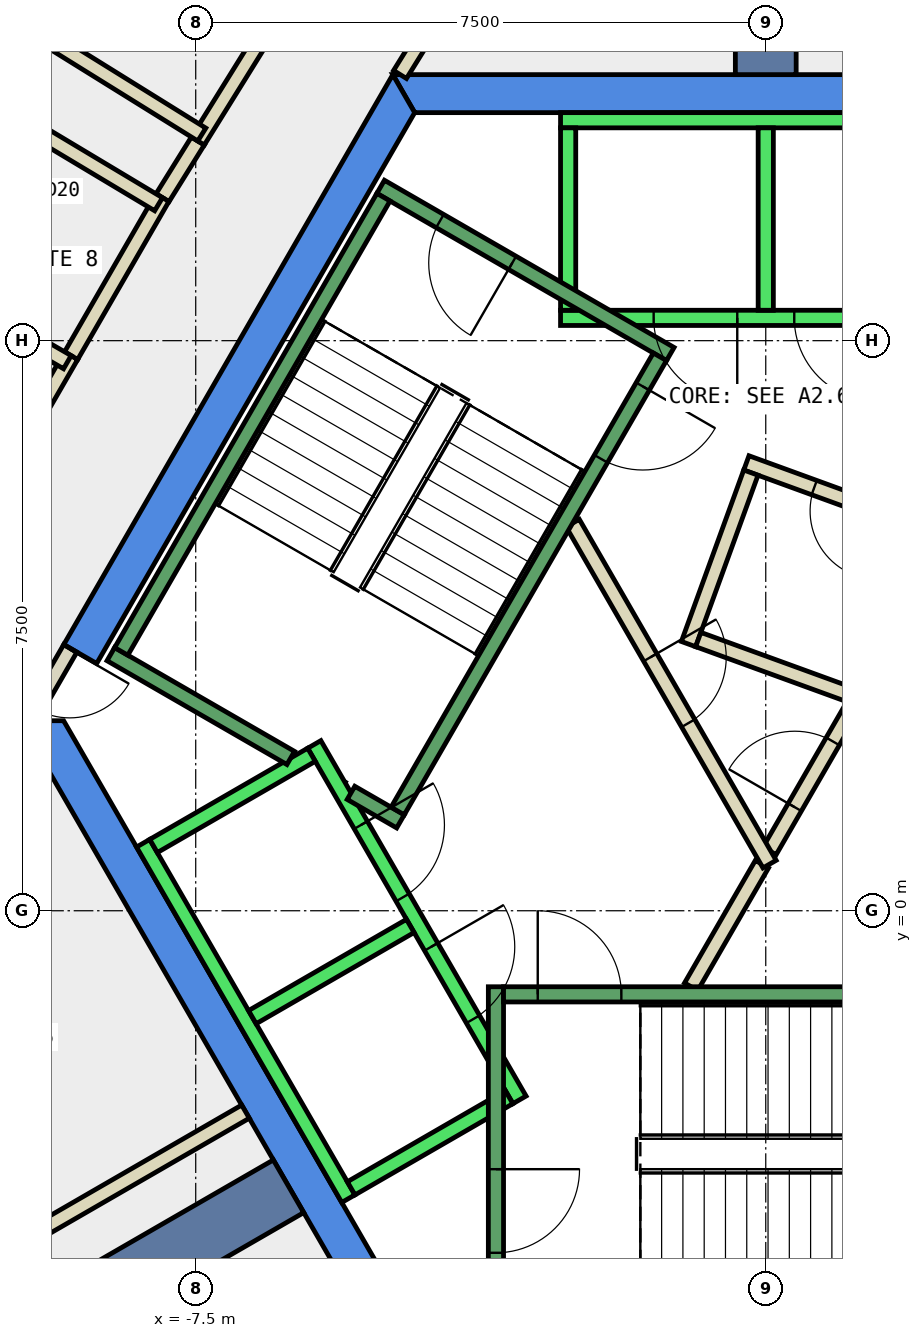
"""IFC4 building model, lengths in metres.
Left out: names, types, materials, properties, quantities, classifications, styles, units other than length and angle.
Written with IfcOpenShell. Run it as: python <this file> out.ifc"""

import sys

from ifc_helpers import new_model, si_unit, direction, frame, frame_2d, origin, place, context, subcontext, project, spatial, polyline, rectangle, outline, extrude, element, fill, save


model = new_model("IFC4")
c1 = context("Model", 3, precision=1e-05, world=origin(), true_north=direction((0.0, 1.0)))
c2 = subcontext(c1, "Body", "Model", "MODEL_VIEW")
j1 = project(units=[si_unit("LENGTHUNIT", "METRE"), si_unit("PLANEANGLEUNIT", "RADIAN")], contexts=[c1])
p1 = place(None, origin())
s1 = spatial("IfcSite", under=j1, at=p1, CompositionType="ELEMENT")
p2 = place(p1, origin())
s2 = spatial("IfcBuilding", under=s1, at=p2, CompositionType="ELEMENT")
p3 = place(p2, frame((0.0, 0.0, 293.6)))
s3 = spatial("IfcBuildingStorey", under=s2, at=p3, CompositionType="ELEMENT", Elevation=293.6)
p4 = place(p3, frame((0.0, 0.0, -0.34)))
e1 = element("IfcWall", 1, at=p4, inside=s3, PredefinedType="SHEAR", context=c2, shape_type="SweptSolid", body=[
    extrude(outline(polyline([(4.907, 11.0), (-4.907, 11.0), (-4.619, 10.5), (4.619, 10.5), (4.907, 11.0)])), origin(), (0.0, 0.0, 1.0), 3.6),
])
p5 = place(p3, frame((0.0, 0.0, -0.34)))
e2 = element("IfcWall", 2, at=p5, inside=s3, PredefinedType="SHEAR", context=c2, shape_type="SweptSolid", body=[
    extrude(outline(polyline([(-9.236, 3.502), (-8.803, 3.253), (-4.619, 10.5), (-4.907, 11.0), (-9.236, 3.502)])), origin(), (0.0, 0.0, 1.0), 3.6),
])
p6 = place(p3, frame((0.0, 0.0, -0.34)))
e3 = element("IfcWall", 3, at=p6, inside=s3, PredefinedType="SHEAR", context=c2, shape_type="SweptSolid", body=[
    extrude(outline(polyline([(-9.815, 2.5), (-4.907, -6.0), (-4.619, -5.5), (-9.238, 2.5), (-9.815, 2.5)])), origin(), (0.0, 0.0, 1.0), 3.6),
])
p7 = place(p3, frame((0.0, 11.0, -0.34), z_axis=(0.0, 0.0, 1.0), x_axis=(0.0, 1.0, 0.0)))
e4 = element("IfcWall", 4, at=p7, inside=s3, PredefinedType="SHEAR", context=c2, shape_type="SweptSolid", body=[
    extrude(rectangle(XDim=9.0, YDim=0.8, at=frame_2d((4.5, 0.0))), origin(), (0.0, 0.0, 1.0), 3.6),
])
p8 = place(p3, frame((-6.279, -3.625, -0.34), z_axis=(0.0, 0.0, 1.0), x_axis=(-0.866017533419, -0.500013631625, 0.0)))
e5 = element("IfcWall", 5, at=p8, inside=s3, PredefinedType="SHEAR", context=c2, shape_type="SweptSolid", body=[
    extrude(rectangle(XDim=9.0, YDim=0.8, at=frame_2d((4.5, 0.0))), origin(), (0.0, 0.0, 1.0), 3.6),
])
p9 = place(p3, frame((2.376, 4.934, 0.0), z_axis=(0.0, 0.0, 1.0), x_axis=(-0.939640574808, 0.342163104635, 0.0)))
e6 = element("IfcWall", 6, at=p9, inside=s3, PredefinedType="PARTITIONING", context=c2, shape_type="SweptSolid", body=[
    extrude(rectangle(XDim=2.8, YDim=0.2, at=frame_2d((1.4, 0.0))), origin(), (0.0, 0.0, 1.0), 3.26),
])
p10 = place(p9, frame((0.95, 0.0, 0.0)))
e7 = element("IfcOpeningElement", 7, at=p10, cuts=e6, PredefinedType="OPENING", context=c2, shape_type="SweptSolid", body=[
    extrude(rectangle(XDim=0.9, YDim=2.1, at=frame_2d((0.45, 1.05))), frame((0.0, 0.11, 0.0), z_axis=(0.0, -1.0, 0.0), x_axis=(1.0, 0.0, 0.0)), (0.0, 0.0, 1.0), 0.22),
])
p11 = place(p3, frame((-0.196, 5.764, 0.0), z_axis=(0.0, 0.0, 1.0), x_axis=(-0.34165322761, -0.939826086073, 0.0)))
e8 = element("IfcWall", 8, at=p11, inside=s3, PredefinedType="PARTITIONING", context=c2, shape_type="SweptSolid", body=[
    extrude(rectangle(XDim=2.4, YDim=0.2, at=frame_2d((1.2, 0.0))), origin(), (0.0, 0.0, 1.0), 3.26),
])
p12 = place(p3, frame((-0.888, 3.568, 0.0), z_axis=(0.0, 0.0, 1.0), x_axis=(0.939685034098, -0.34204098686, 0.0)))
e9 = element("IfcWall", 9, at=p12, inside=s3, PredefinedType="PARTITIONING", context=c2, shape_type="SweptSolid", body=[
    extrude(rectangle(XDim=2.237, YDim=0.2, at=frame_2d((1.119, 0.0))), origin(), (0.0, 0.0, 1.0), 3.26),
])
p13 = place(p3, frame((-4.478, 11.54, 0.0), z_axis=(0.0, 0.0, 1.0), x_axis=(-0.527362861778, -0.849640166198, 0.0)))
e10 = element("IfcWall", 10, at=p13, inside=s3, PredefinedType="PARTITIONING", context=c2, shape_type="SweptSolid", body=[
    extrude(rectangle(XDim=0.633, YDim=0.2, at=frame_2d((0.317, 0.0))), origin(), (0.0, 0.0, 1.0), 3.26),
])
p14 = place(p3, frame((-7.937, 9.38, 0.0), z_axis=(0.0, 0.0, 1.0), x_axis=(0.52850186976, 0.848932137252, 0.0)))
e11 = element("IfcWall", 11, at=p14, inside=s3, PredefinedType="PARTITIONING", context=c2, shape_type="SweptSolid", body=[
    extrude(rectangle(XDim=0.88, YDim=0.2, at=frame_2d((0.44, 0.0))), origin(), (0.0, 0.0, 1.0), 3.26),
])
p15 = place(p3, frame((-7.472, 10.127, 0.0), z_axis=(0.0, 0.0, 1.0), x_axis=(0.527707224705, 0.849426326996, 0.0)))
e12 = element("IfcWall", 12, at=p15, inside=s3, PredefinedType="PARTITIONING", context=c2, shape_type="SweptSolid", body=[
    extrude(rectangle(XDim=3.0, YDim=0.2, at=frame_2d((1.5, 0.0))), origin(), (0.0, 0.0, 1.0), 3.26),
])
p16 = place(p3, frame((-12.082, 2.207, 0.0), z_axis=(0.0, 0.0, 1.0), x_axis=(0.500123454404, 0.865954115618, 0.0)))
e13 = element("IfcWall", 13, at=p16, inside=s3, PredefinedType="PARTITIONING", context=c2, shape_type="SweptSolid", body=[
    extrude(rectangle(XDim=5.885, YDim=0.2, at=frame_2d((2.942, 0.0))), origin(), (0.0, 0.0, 1.0), 3.26),
])
p17 = place(p16, frame((2.493, 0.0, 0.0)))
e14 = element("IfcOpeningElement", 14, at=p17, cuts=e13, PredefinedType="OPENING", context=c2, shape_type="SweptSolid", body=[
    extrude(rectangle(XDim=1.0, YDim=2.1, at=frame_2d((0.5, 1.05))), frame((0.0, 0.11, 0.0), z_axis=(0.0, -1.0, 0.0), x_axis=(1.0, 0.0, 0.0)), (0.0, 0.0, 1.0), 0.22),
])
p18 = place(p3, frame((-9.139, 7.303, 0.0), z_axis=(0.0, 0.0, 1.0), x_axis=(0.499869187296, 0.866100915363, 0.0)))
e15 = element("IfcWall", 15, at=p18, inside=s3, PredefinedType="PARTITIONING", context=c2, shape_type="SweptSolid", body=[
    extrude(rectangle(XDim=2.401, YDim=0.2, at=frame_2d((1.2, 0.0))), origin(), (0.0, 0.0, 1.0), 3.26),
])
p19 = place(p3, frame((-0.982, -1.0, 0.0), z_axis=(0.0, 0.0, 1.0), x_axis=(0.50024047865, 0.865886518847, 0.0)))
e16 = element("IfcWall", 16, at=p19, inside=s3, PredefinedType="PARTITIONING", context=c2, shape_type="SweptSolid", body=[
    extrude(rectangle(XDim=1.863, YDim=0.2, at=frame_2d((0.931, 0.0))), origin(), (0.0, 0.0, 1.0), 3.26),
])
p20 = place(p3, frame((0.05, 0.787, 0.0), z_axis=(0.0, 0.0, 1.0), x_axis=(0.499945861543, 0.866056658381, 0.0)))
e17 = element("IfcWall", 17, at=p20, inside=s3, PredefinedType="PARTITIONING", context=c2, shape_type="SweptSolid", body=[
    extrude(rectangle(XDim=2.428, YDim=0.2, at=frame_2d((1.214, 0.0))), origin(), (0.0, 0.0, 1.0), 3.26),
])
p21 = place(p20, frame((0.664, 0.0, 0.0)))
e18 = element("IfcOpeningElement", 18, at=p21, cuts=e17, PredefinedType="OPENING", context=c2, shape_type="SweptSolid", body=[
    extrude(rectangle(XDim=1.0, YDim=2.1, at=frame_2d((0.5, 1.05))), frame((0.0, 0.11, 0.0), z_axis=(0.0, -1.0, 0.0), x_axis=(1.0, 0.0, 0.0)), (0.0, 0.0, 1.0), 0.22),
])
p22 = place(p3, frame((-2.54, 5.1, 0.0), z_axis=(0.0, 0.0, 1.0), x_axis=(0.499925051871, -0.866068670783, 0.0)))
e19 = element("IfcWall", 19, at=p22, inside=s3, PredefinedType="PARTITIONING", context=c2, shape_type="SweptSolid", body=[
    extrude(rectangle(XDim=5.181, YDim=0.2, at=frame_2d((2.59, 0.0))), origin(), (0.0, 0.0, 1.0), 3.26),
])
p23 = place(p22, frame((2.04, 0.0, 0.0)))
e20 = element("IfcOpeningElement", 20, at=p23, cuts=e19, PredefinedType="OPENING", context=c2, shape_type="SweptSolid", body=[
    extrude(rectangle(XDim=1.0, YDim=2.1, at=frame_2d((0.5, 1.05))), frame((0.0, 0.11, 0.0), z_axis=(0.0, -1.0, 0.0), x_axis=(1.0, 0.0, 0.0)), (0.0, 0.0, 1.0), 0.22),
])
p24 = place(p3, frame((-6.845, -2.643, 0.0), z_axis=(0.0, 0.0, 1.0), x_axis=(-0.865994457699, -0.500053596362, 0.0)))
e21 = element("IfcWall", 21, at=p24, inside=s3, PredefinedType="PARTITIONING", context=c2, shape_type="SweptSolid", body=[
    extrude(rectangle(XDim=6.701, YDim=0.2, at=frame_2d((3.351, 0.0))), origin(), (0.0, 0.0, 1.0), 3.26),
])
p25 = place(p3, frame((-9.543, 11.531, 0.0), z_axis=(0.0, 0.0, 1.0), x_axis=(0.849400119549, -0.527749407305, 0.0)))
e22 = element("IfcWall", 22, at=p25, inside=s3, PredefinedType="PARTITIONING", context=c2, shape_type="SweptSolid", body=[
    extrude(rectangle(XDim=2.5, YDim=0.2, at=frame_2d((1.25, 0.0))), origin(), (0.0, 0.0, 1.0), 3.26),
])
for number, where, z_axis, x_axis in (
    (23, (-7.989, 9.295, 0.0), (0.0, 0.0, 1.0), (-0.858, 0.514, 0.0)),
    (24, (-11.181, 8.367, 0.0), (0.0, 0.0, 1.0), (0.866, -0.5, 0.0)),
):
    element("IfcWall", number, at=place(p3, frame(where, z_axis=z_axis, x_axis=x_axis)), inside=s3, PredefinedType="PARTITIONING", context=c2, shape_type="SweptSolid", body=[
        extrude(rectangle(XDim=2.3, YDim=0.2, at=frame_2d((1.15, 0.0))), origin(), (0.0, 0.0, 1.0), 3.26),
    ])
p26 = place(p3, frame((-9.15, 3.452, 0.0), z_axis=(0.0, 0.0, 1.0), x_axis=(-0.500079945886, -0.865979242085, 0.0)))
e25 = element("IfcWall", 25, at=p26, inside=s3, PredefinedType="PARTITIONING", context=c2, shape_type="SweptSolid", body=[
    extrude(rectangle(XDim=0.926, YDim=0.2, at=frame_2d((0.463, 0.0))), origin(), (0.0, 0.0, 1.0), 2.4),
])
p27 = place(p26, frame((0.017, 0.0, 0.0)))
e26 = element("IfcOpeningElement", 26, at=p27, cuts=e25, PredefinedType="OPENING", context=c2, shape_type="SweptSolid", body=[
    extrude(rectangle(XDim=0.9, YDim=2.1, at=frame_2d((0.45, 1.05))), frame((0.0, 0.11, 0.0), z_axis=(0.0, -1.0, 0.0), x_axis=(1.0, 0.0, 0.0)), (0.0, 0.0, 1.0), 0.22),
])
p28 = place(p3, frame((2.7, 7.8, 0.0), z_axis=(0.0, 0.0, 1.0), x_axis=(-1.0, 0.0, 0.0)))
e27 = element("IfcWall", 27, at=p28, inside=s3, PredefinedType="STANDARD", context=c2, shape_type="SweptSolid", body=[
    extrude(rectangle(XDim=5.4, YDim=0.2, at=frame_2d((2.7, 0.0))), origin(), (0.0, 0.0, 1.0), 3.26),
])
p29 = place(p28, frame((1.225, 0.0, 0.0)))
e28 = element("IfcOpeningElement", 28, at=p29, cuts=e27, PredefinedType="OPENING", context=c2, shape_type="SweptSolid", body=[
    extrude(rectangle(XDim=1.1, YDim=2.1, at=frame_2d((0.55, 1.05))), frame((0.0, 0.11, 0.0), z_axis=(0.0, -1.0, 0.0), x_axis=(1.0, 0.0, 0.0)), (0.0, 0.0, 1.0), 0.22),
])
p30 = place(p28, frame((3.075, 0.0, 0.0)))
e29 = element("IfcOpeningElement", 29, at=p30, cuts=e27, PredefinedType="OPENING", context=c2, shape_type="SweptSolid", body=[
    extrude(rectangle(XDim=1.1, YDim=2.1, at=frame_2d((0.55, 1.05))), frame((0.0, 0.11, 0.0), z_axis=(0.0, -1.0, 0.0), x_axis=(1.0, 0.0, 0.0)), (0.0, 0.0, 1.0), 0.22),
])
p31 = place(p3, frame((2.7, 10.4, 0.0), z_axis=(0.0, 0.0, 1.0), x_axis=(-1.0, 0.0, 0.0)))
e30 = element("IfcWall", 30, at=p31, inside=s3, PredefinedType="STANDARD", context=c2, shape_type="SweptSolid", body=[
    extrude(rectangle(XDim=5.4, YDim=0.2, at=frame_2d((2.7, 0.0))), origin(), (0.0, 0.0, 1.0), 3.26),
])
for number, where, z_axis, x_axis in (
    (31, (0.0, 7.9, 0.0), (0.0, 0.0, 1.0), (0.0, 1.0, 0.0)),
    (32, (-2.6, 7.9, 0.0), (0.0, 0.0, 1.0), (0.0, 1.0, 0.0)),
):
    element("IfcWall", number, at=place(p3, frame(where, z_axis=z_axis, x_axis=x_axis)), inside=s3, PredefinedType="STANDARD", context=c2, shape_type="SweptSolid", body=[
        extrude(rectangle(XDim=2.4, YDim=0.2, at=frame_2d((1.2, 0.0))), origin(), (0.0, 0.0, 1.0), 3.26),
    ])
p32 = place(p3, frame((-5.94, 2.188, 0.0), z_axis=(0.0, 0.0, 1.0), x_axis=(0.500034260056, -0.866005622828, 0.0)))
e33 = element("IfcWall", 33, at=p32, inside=s3, PredefinedType="STANDARD", context=c2, shape_type="SweptSolid", body=[
    extrude(rectangle(XDim=5.399, YDim=0.2, at=frame_2d((2.7, 0.0))), origin(), (0.0, 0.0, 1.0), 3.26),
])
p33 = place(p32, frame((3.075, 0.0, 0.0)))
e34 = element("IfcOpeningElement", 34, at=p33, cuts=e33, PredefinedType="OPENING", context=c2, shape_type="SweptSolid", body=[
    extrude(rectangle(XDim=1.1, YDim=2.1, at=frame_2d((0.55, 1.05))), frame((0.0, 0.11, 0.0), z_axis=(0.0, -1.0, 0.0), x_axis=(1.0, 0.0, 0.0)), (0.0, 0.0, 1.0), 0.22),
])
p34 = place(p32, frame((1.225, 0.0, 0.0)))
e35 = element("IfcOpeningElement", 35, at=p34, cuts=e33, PredefinedType="OPENING", context=c2, shape_type="SweptSolid", body=[
    extrude(rectangle(XDim=1.1, YDim=2.1, at=frame_2d((0.55, 1.05))), frame((0.0, 0.11, 0.0), z_axis=(0.0, -1.0, 0.0), x_axis=(1.0, 0.0, 0.0)), (0.0, 0.0, 1.0), 0.22),
])
p35 = place(p3, frame((-8.192, 0.888, 0.0), z_axis=(0.0, 0.0, 1.0), x_axis=(0.500034260056, -0.866005622828, 0.0)))
e36 = element("IfcWall", 36, at=p35, inside=s3, PredefinedType="STANDARD", context=c2, shape_type="SweptSolid", body=[
    extrude(rectangle(XDim=5.399, YDim=0.2, at=frame_2d((2.7, 0.0))), origin(), (0.0, 0.0, 1.0), 3.26),
])
for number, where, z_axis, x_axis in (
    (37, (-5.977, 2.052, 0.0), (0.0, 0.0, 1.0), (-0.866, -0.5, 0.0)),
    (38, (-4.677, -0.2, 0.0), (0.0, 0.0, 1.0), (-0.866, -0.5, 0.0)),
):
    element("IfcWall", number, at=place(p3, frame(where, z_axis=z_axis, x_axis=x_axis)), inside=s3, PredefinedType="STANDARD", context=c2, shape_type="SweptSolid", body=[
        extrude(rectangle(XDim=2.399, YDim=0.2, at=frame_2d((1.2, 0.0))), origin(), (0.0, 0.0, 1.0), 3.26),
    ])
p36 = place(p3, frame((-3.377, -2.452, 0.0), z_axis=(0.0, 0.0, 1.0), x_axis=(-0.865955154139, -0.50012165622, 0.0)))
e39 = element("IfcWall", 39, at=p36, inside=s3, PredefinedType="STANDARD", context=c2, shape_type="SweptSolid", body=[
    extrude(rectangle(XDim=2.4, YDim=0.2, at=frame_2d((1.2, 0.0))), origin(), (0.0, 0.0, 1.0), 3.26),
])
p37 = place(p3, frame((-3.55, -1.0, 0.0), z_axis=(0.0, 0.0, 1.0), x_axis=(0.0, -1.0, 0.0)))
e40 = element("IfcWall", 40, at=p37, inside=s3, PredefinedType="STANDARD", context=c2, shape_type="SweptSolid", body=[
    extrude(rectangle(XDim=4.4, YDim=0.2, at=frame_2d((2.2, 0.0))), origin(), (0.0, 0.0, 1.0), 3.26),
])
p38 = place(p37, frame((2.4, 0.0, 0.0)))
e41 = element("IfcOpeningElement", 41, at=p38, cuts=e40, PredefinedType="OPENING", context=c2, shape_type="SweptSolid", body=[
    extrude(rectangle(XDim=1.1, YDim=2.2, at=frame_2d((0.55, 1.1))), frame((0.0, 0.11, 0.0), z_axis=(0.0, -1.0, 0.0), x_axis=(1.0, 0.0, 0.0)), (0.0, 0.0, 1.0), 0.22),
])
p39 = place(p3, frame((-3.45, -1.1, 0.0), z_axis=(0.0, 0.0, 1.0), x_axis=(1.0, 0.0, 0.0)))
e42 = element("IfcWall", 42, at=p39, inside=s3, PredefinedType="STANDARD", context=c2, shape_type="SweptSolid", body=[
    extrude(rectangle(XDim=6.9, YDim=0.2, at=frame_2d((3.45, 0.0))), origin(), (0.0, 0.0, 1.0), 3.26),
])
p40 = place(p39, frame((0.45, 0.0, 0.0)))
e43 = element("IfcOpeningElement", 43, at=p40, cuts=e42, PredefinedType="OPENING", context=c2, shape_type="SweptSolid", body=[
    extrude(rectangle(XDim=1.1, YDim=2.2, at=frame_2d((0.55, 1.1))), frame((0.0, 0.11, 0.0), z_axis=(0.0, -1.0, 0.0), x_axis=(1.0, 0.0, 0.0)), (0.0, 0.0, 1.0), 0.22),
])
p41 = place(p3, frame((-1.256, 7.324, 0.0), z_axis=(0.0, 0.0, 1.0), x_axis=(-0.866046073146, 0.499964197906, 0.0)))
e44 = element("IfcWall", 44, at=p41, inside=s3, PredefinedType="STANDARD", context=c2, shape_type="SweptSolid", body=[
    extrude(rectangle(XDim=4.4, YDim=0.2, at=frame_2d((2.2, 0.0))), origin(), (0.0, 0.0, 1.0), 3.26),
])
p42 = place(p41, frame((2.4, 0.0, 0.0)))
e45 = element("IfcOpeningElement", 45, at=p42, cuts=e44, PredefinedType="OPENING", context=c2, shape_type="SweptSolid", body=[
    extrude(rectangle(XDim=1.1, YDim=2.2, at=frame_2d((0.55, 1.1))), frame((0.0, 0.11, 0.0), z_axis=(0.0, -1.0, 0.0), x_axis=(1.0, 0.0, 0.0)), (0.0, 0.0, 1.0), 0.22),
])
p43 = place(p3, frame((-6.25, 2.01, 0.0), z_axis=(0.0, 0.0, 1.0), x_axis=(-0.86611865017, 0.499838457731, 0.0)))
e46 = element("IfcWall", 46, at=p43, inside=s3, PredefinedType="STANDARD", context=c2, shape_type="SweptSolid", body=[
    extrude(rectangle(XDim=2.733, YDim=0.2, at=frame_2d((1.366, 0.0))), origin(), (0.0, 0.0, 1.0), 3.26),
])
p44 = place(p3, frame((-4.806, 1.176, 0.0), z_axis=(0.0, 0.0, 1.0), x_axis=(-0.866558586415, 0.499075361355, 0.0)))
e47 = element("IfcWall", 47, at=p44, inside=s3, PredefinedType="STANDARD", context=c2, shape_type="SweptSolid", body=[
    extrude(rectangle(XDim=0.751, YDim=0.2, at=frame_2d((0.376, 0.0))), origin(), (0.0, 0.0, 1.0), 3.26),
])
p45 = place(p3, frame((-1.393, 7.288, 0.0), z_axis=(0.0, 0.0, 1.0), x_axis=(-0.499963383562, -0.866046543262, 0.0)))
e48 = element("IfcWall", 48, at=p45, inside=s3, PredefinedType="STANDARD", context=c2, shape_type="SweptSolid", body=[
    extrude(rectangle(XDim=6.9, YDim=0.2, at=frame_2d((3.45, 0.0))), origin(), (0.0, 0.0, 1.0), 3.26),
])
p46 = place(p45, frame((0.45, 0.0, 0.0)))
e49 = element("IfcOpeningElement", 49, at=p46, cuts=e48, PredefinedType="OPENING", context=c2, shape_type="SweptSolid", body=[
    extrude(rectangle(XDim=1.1, YDim=2.2, at=frame_2d((0.55, 1.1))), frame((0.0, 0.11, 0.0), z_axis=(0.0, -1.0, 0.0), x_axis=(1.0, 0.0, 0.0)), (0.0, 0.0, 1.0), 0.22),
])
p47 = place(p3, frame((-5.03, 9.388, 0.0), z_axis=(0.0, 0.0, 1.0), x_axis=(-0.499978703459, -0.866037698999, 0.0)))
e50 = element("IfcWall", 50, at=p47, inside=s3, PredefinedType="STANDARD", context=c2, shape_type="SweptSolid", body=[
    extrude(rectangle(XDim=6.9, YDim=0.2, at=frame_2d((3.45, 0.0))), origin(), (0.0, 0.0, 1.0), 3.26),
])
p48 = place(p21, origin())
e51 = element("IfcDoor", 51, at=p48, inside=s3, OperationType="SINGLE_SWING_RIGHT", PredefinedType="DOOR", context=c2, shape_type="SweptSolid", body=[
    extrude(rectangle(XDim=1.0, YDim=2.1, at=frame_2d((0.5, 1.05))), frame((0.0, 0.025, 0.0), z_axis=(0.0, -1.0, 0.0), x_axis=(1.0, 0.0, 0.0)), (0.0, 0.0, 1.0), 0.05),
])
fill(e18, e51)
p49 = place(p23, origin())
e52 = element("IfcDoor", 52, at=p49, inside=s3, OperationType="SINGLE_SWING_RIGHT", PredefinedType="DOOR", context=c2, shape_type="SweptSolid", body=[
    extrude(rectangle(XDim=1.0, YDim=2.1, at=frame_2d((0.5, 1.05))), frame((0.0, 0.025, 0.0), z_axis=(0.0, -1.0, 0.0), x_axis=(1.0, 0.0, 0.0)), (0.0, 0.0, 1.0), 0.05),
])
fill(e20, e52)
p50 = place(p10, origin())
e53 = element("IfcDoor", 53, at=p50, inside=s3, OperationType="SINGLE_SWING_LEFT", PredefinedType="DOOR", context=c2, shape_type="SweptSolid", body=[
    extrude(rectangle(XDim=0.9, YDim=2.1, at=frame_2d((0.45, 1.05))), frame((0.0, 0.025, 0.0), z_axis=(0.0, -1.0, 0.0), x_axis=(1.0, 0.0, 0.0)), (0.0, 0.0, 1.0), 0.05),
])
fill(e7, e53)
p51 = place(p27, origin())
e54 = element("IfcDoor", 54, at=p51, inside=s3, OperationType="SINGLE_SWING_LEFT", PredefinedType="DOOR", context=c2, shape_type="SweptSolid", body=[
    extrude(rectangle(XDim=0.9, YDim=2.1, at=frame_2d((0.45, 1.05))), frame((0.0, 0.025, 0.0), z_axis=(0.0, -1.0, 0.0), x_axis=(1.0, 0.0, 0.0)), (0.0, 0.0, 1.0), 0.05),
])
fill(e26, e54)
p52 = place(p29, origin())
e55 = element("IfcDoor", 55, at=p52, inside=s3, OperationType="SLIDING_TO_LEFT", PredefinedType="DOOR", context=c2, shape_type="SweptSolid", body=[
    extrude(rectangle(XDim=1.1, YDim=2.1, at=frame_2d((0.55, 1.05))), frame((0.0, 0.025, 0.0), z_axis=(0.0, -1.0, 0.0), x_axis=(1.0, 0.0, 0.0)), (0.0, 0.0, 1.0), 0.05),
])
fill(e28, e55)
p53 = place(p30, origin())
e56 = element("IfcDoor", 56, at=p53, inside=s3, OperationType="SLIDING_TO_LEFT", PredefinedType="DOOR", context=c2, shape_type="SweptSolid", body=[
    extrude(rectangle(XDim=1.1, YDim=2.1, at=frame_2d((0.55, 1.05))), frame((0.0, 0.025, 0.0), z_axis=(0.0, -1.0, 0.0), x_axis=(1.0, 0.0, 0.0)), (0.0, 0.0, 1.0), 0.05),
])
fill(e29, e56)
p54 = place(p33, origin())
e57 = element("IfcDoor", 57, at=p54, inside=s3, OperationType="SLIDING_TO_LEFT", PredefinedType="DOOR", context=c2, shape_type="SweptSolid", body=[
    extrude(rectangle(XDim=1.1, YDim=2.1, at=frame_2d((0.55, 1.05))), frame((0.0, 0.025, 0.0), z_axis=(0.0, -1.0, 0.0), x_axis=(1.0, 0.0, 0.0)), (0.0, 0.0, 1.0), 0.05),
])
fill(e34, e57)
p55 = place(p34, origin())
e58 = element("IfcDoor", 58, at=p55, inside=s3, OperationType="SLIDING_TO_LEFT", PredefinedType="DOOR", context=c2, shape_type="SweptSolid", body=[
    extrude(rectangle(XDim=1.1, YDim=2.1, at=frame_2d((0.55, 1.05))), frame((0.0, 0.025, 0.0), z_axis=(0.0, -1.0, 0.0), x_axis=(1.0, 0.0, 0.0)), (0.0, 0.0, 1.0), 0.05),
])
fill(e35, e58)
p56 = place(p40, origin())
e59 = element("IfcDoor", 59, at=p56, inside=s3, OperationType="SINGLE_SWING_LEFT", PredefinedType="DOOR", context=c2, shape_type="SweptSolid", body=[
    extrude(rectangle(XDim=1.1, YDim=2.2, at=frame_2d((0.55, 1.1))), frame((0.0, 0.025, 0.0), z_axis=(0.0, -1.0, 0.0), x_axis=(1.0, 0.0, 0.0)), (0.0, 0.0, 1.0), 0.05),
])
fill(e43, e59)
p57 = place(p38, origin())
e60 = element("IfcDoor", 60, at=p57, inside=s3, OperationType="SINGLE_SWING_LEFT", PredefinedType="DOOR", context=c2, shape_type="SweptSolid", body=[
    extrude(rectangle(XDim=1.1, YDim=2.2, at=frame_2d((0.55, 1.1))), frame((0.0, 0.025, 0.0), z_axis=(0.0, -1.0, 0.0), x_axis=(1.0, 0.0, 0.0)), (0.0, 0.0, 1.0), 0.05),
])
fill(e41, e60)
p58 = place(p46, origin())
e61 = element("IfcDoor", 61, at=p58, inside=s3, OperationType="SINGLE_SWING_LEFT", PredefinedType="DOOR", context=c2, shape_type="SweptSolid", body=[
    extrude(rectangle(XDim=1.1, YDim=2.2, at=frame_2d((0.55, 1.1))), frame((0.0, 0.025, 0.0), z_axis=(0.0, -1.0, 0.0), x_axis=(1.0, 0.0, 0.0)), (0.0, 0.0, 1.0), 0.05),
])
fill(e49, e61)
p59 = place(p42, origin())
e62 = element("IfcDoor", 62, at=p59, inside=s3, OperationType="SINGLE_SWING_LEFT", PredefinedType="DOOR", context=c2, shape_type="SweptSolid", body=[
    extrude(rectangle(XDim=1.1, YDim=2.2, at=frame_2d((0.55, 1.1))), frame((0.0, 0.025, 0.0), z_axis=(0.0, -1.0, 0.0), x_axis=(1.0, 0.0, 0.0)), (0.0, 0.0, 1.0), 0.05),
])
fill(e45, e62)
save(model, sys.argv[1])
